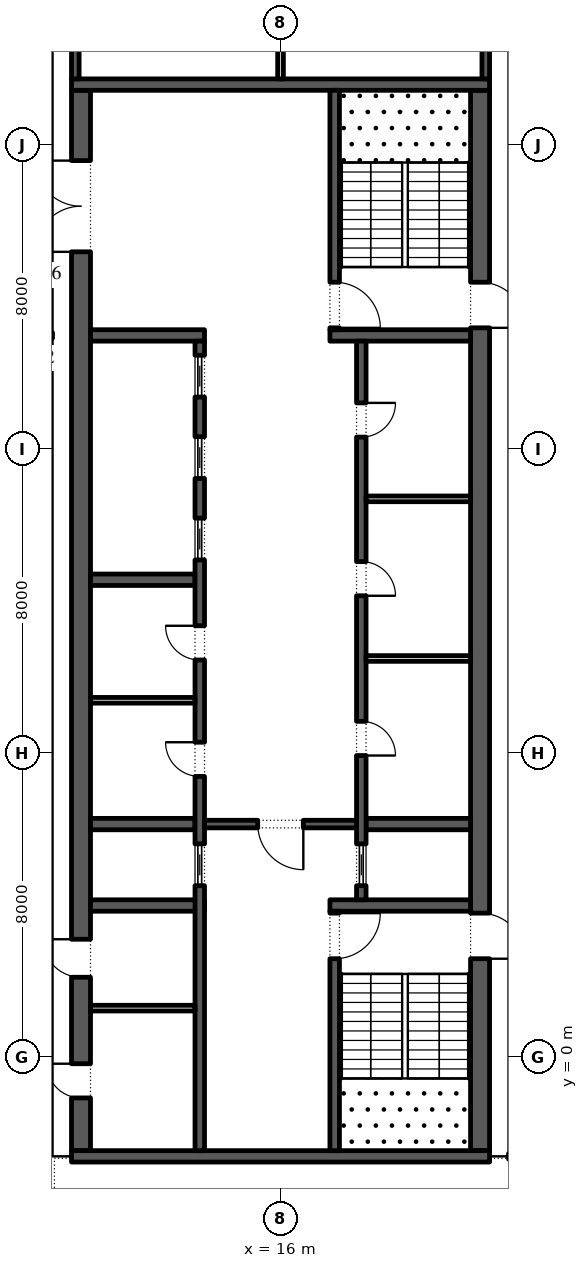
"""IFC4 building model, lengths in metres.
Left out: names, types, materials, properties, quantities, classifications, styles, units other than length and angle.
Written with IfcOpenShell. Run it as: python <this file> out.ifc"""

import sys

from ifc_helpers import new_model, si_unit, direction, frame, frame_2d, origin, place, context, subcontext, project, spatial, rectangle, extrude, element, fill, save


model = new_model("IFC4")
c1 = context("Model", 3, precision=1e-05, world=origin(), true_north=direction((0.0, 1.0)))
c2 = subcontext(c1, "Body", "Model", "MODEL_VIEW")
j1 = project(units=[si_unit("LENGTHUNIT", "METRE"), si_unit("PLANEANGLEUNIT", "RADIAN")], contexts=[c1])
p1 = place(None, origin())
s1 = spatial("IfcSite", under=j1, at=p1, CompositionType="ELEMENT")
p2 = place(p1, origin())
s2 = spatial("IfcBuilding", under=s1, at=p2, CompositionType="ELEMENT")
p3 = place(p2, frame((0.0, 0.0, 338.4)))
s3 = spatial("IfcBuildingStorey", under=s2, at=p3, CompositionType="ELEMENT", Elevation=338.4)
p4 = place(p3, frame((21.25, -2.45, 0.0), z_axis=(0.0, 0.0, 1.0), x_axis=(0.0, 1.0, 0.0)))
e1 = element("IfcWall", 1, at=p4, inside=s3, PredefinedType="SHEAR", context=c2, shape_type="SweptSolid", body=[
    extrude(rectangle(XDim=27.9, YDim=0.5, at=frame_2d((13.95, 0.0))), origin(), (0.0, 0.0, 1.0), 4.0),
])
p5 = place(p4, frame((5.05, 0.0, 0.0)))
e2 = element("IfcOpeningElement", 2, at=p5, cuts=e1, PredefinedType="OPENING", context=c2, shape_type="SweptSolid", body=[
    extrude(rectangle(XDim=1.2, YDim=2.1, at=frame_2d((0.6, 1.05))), frame((0.0, 0.26, 0.0), z_axis=(0.0, -1.0, 0.0), x_axis=(1.0, 0.0, 0.0)), (0.0, 0.0, 1.0), 0.52),
])
p6 = place(p4, frame((21.65, 0.0, 0.0)))
e3 = element("IfcOpeningElement", 3, at=p6, cuts=e1, PredefinedType="OPENING", context=c2, shape_type="SweptSolid", body=[
    extrude(rectangle(XDim=1.2, YDim=2.1, at=frame_2d((0.6, 1.05))), frame((0.0, 0.26, 0.0), z_axis=(0.0, -1.0, 0.0), x_axis=(1.0, 0.0, 0.0)), (0.0, 0.0, 1.0), 0.52),
])
p7 = place(p3, frame((10.75, -2.45, 0.0), z_axis=(0.0, 0.0, 1.0), x_axis=(0.0, 1.0, 0.0)))
e4 = element("IfcWall", 4, at=p7, inside=s3, PredefinedType="SHEAR", context=c2, shape_type="SweptSolid", body=[
    extrude(rectangle(XDim=27.9, YDim=0.5, at=frame_2d((13.95, 0.0))), origin(), (0.0, 0.0, 1.0), 4.0),
])
p8 = place(p7, frame((23.65, 0.0, 0.0)))
e5 = element("IfcOpeningElement", 5, at=p8, cuts=e4, PredefinedType="OPENING", context=c2, shape_type="SweptSolid", body=[
    extrude(rectangle(XDim=2.4, YDim=2.1, at=frame_2d((1.2, 1.05))), frame((0.0, 0.26, 0.0), z_axis=(0.0, -1.0, 0.0), x_axis=(1.0, 0.0, 0.0)), (0.0, 0.0, 1.0), 0.52),
])
p9 = place(p7, frame((1.387, 0.0, 0.0)))
e6 = element("IfcOpeningElement", 6, at=p9, cuts=e4, PredefinedType="OPENING", context=c2, shape_type="SweptSolid", body=[
    extrude(rectangle(XDim=0.9, YDim=2.1, at=frame_2d((0.45, 1.05))), frame((0.0, 0.26, 0.0), z_axis=(0.0, -1.0, 0.0), x_axis=(1.0, 0.0, 0.0)), (0.0, 0.0, 1.0), 0.52),
])
p10 = place(p7, frame((4.562, 0.0, 0.0)))
e7 = element("IfcOpeningElement", 7, at=p10, cuts=e4, PredefinedType="OPENING", context=c2, shape_type="SweptSolid", body=[
    extrude(rectangle(XDim=1.0, YDim=2.1, at=frame_2d((0.5, 1.05))), frame((0.0, 0.26, 0.0), z_axis=(0.0, -1.0, 0.0), x_axis=(1.0, 0.0, 0.0)), (0.0, 0.0, 1.0), 0.52),
])
for number, where, z_axis, x_axis in (
    (8, (10.5, -2.6, 0.0), (0.0, 0.0, 1.0), (1.0, 0.0, 0.0)),
    (9, (10.5, 25.6, 0.0), (0.0, 0.0, 1.0), (1.0, 0.0, 0.0)),
):
    element("IfcWall", number, at=place(p3, frame(where, z_axis=z_axis, x_axis=x_axis)), inside=s3, PredefinedType="SHEAR", context=c2, shape_type="SweptSolid", body=[
        extrude(rectangle(XDim=11.0, YDim=0.3, at=frame_2d((5.5, 0.0))), origin(), (0.0, 0.0, 1.0), 4.0),
    ])
p11 = place(p3, frame((17.3, 4.0, 0.0), z_axis=(0.0, 0.0, 1.0), x_axis=(1.0, 0.0, 0.0)))
e10 = element("IfcWall", 10, at=p11, inside=s3, PredefinedType="SHEAR", context=c2, shape_type="SweptSolid", body=[
    extrude(rectangle(XDim=3.7, YDim=0.3, at=frame_2d((1.85, 0.0))), origin(), (0.0, 0.0, 1.0), 4.0),
])
p12 = place(p3, frame((17.425, -2.45, 0.0), z_axis=(0.0, 0.0, 1.0), x_axis=(0.0, 1.0, 0.0)))
e11 = element("IfcWall", 11, at=p12, inside=s3, PredefinedType="SHEAR", context=c2, shape_type="SweptSolid", body=[
    extrude(rectangle(XDim=6.3, YDim=0.25, at=frame_2d((3.15, 0.0))), origin(), (0.0, 0.0, 1.0), 4.0),
])
p13 = place(p12, frame((5.05, 0.0, 0.0)))
e12 = element("IfcOpeningElement", 12, at=p13, cuts=e11, PredefinedType="OPENING", context=c2, shape_type="SweptSolid", body=[
    extrude(rectangle(XDim=1.2, YDim=2.1, at=frame_2d((0.6, 1.05))), frame((0.0, 0.135, 0.0), z_axis=(0.0, -1.0, 0.0), x_axis=(1.0, 0.0, 0.0)), (0.0, 0.0, 1.0), 0.27),
])
p14 = place(p3, frame((17.3, 19.0, 0.0), z_axis=(0.0, 0.0, 1.0), x_axis=(1.0, 0.0, 0.0)))
e13 = element("IfcWall", 13, at=p14, inside=s3, PredefinedType="SHEAR", context=c2, shape_type="SweptSolid", body=[
    extrude(rectangle(XDim=3.7, YDim=0.3, at=frame_2d((1.85, 0.0))), origin(), (0.0, 0.0, 1.0), 4.0),
])
p15 = place(p3, frame((17.425, 19.15, 0.0), z_axis=(0.0, 0.0, 1.0), x_axis=(0.0, 1.0, 0.0)))
e14 = element("IfcWall", 14, at=p15, inside=s3, PredefinedType="SHEAR", context=c2, shape_type="SweptSolid", body=[
    extrude(rectangle(XDim=6.3, YDim=0.25, at=frame_2d((3.15, 0.0))), origin(), (0.0, 0.0, 1.0), 4.0),
])
p16 = place(p15, frame((0.05, 0.0, 0.0)))
e15 = element("IfcOpeningElement", 15, at=p16, cuts=e14, PredefinedType="OPENING", context=c2, shape_type="SweptSolid", body=[
    extrude(rectangle(XDim=1.2, YDim=2.1, at=frame_2d((0.6, 1.05))), frame((0.0, 0.135, 0.0), z_axis=(0.0, -1.0, 0.0), x_axis=(1.0, 0.0, 0.0)), (0.0, 0.0, 1.0), 0.27),
])
p17 = place(p3, frame((18.25, 6.143, 0.0), z_axis=(0.0, 0.0, 1.0), x_axis=(1.0, 0.0, 0.0)))
e16 = element("IfcWall", 16, at=p17, inside=s3, PredefinedType="SHEAR", context=c2, shape_type="SweptSolid", body=[
    extrude(rectangle(XDim=2.75, YDim=0.3, at=frame_2d((1.375, 0.0))), origin(), (0.0, 0.0, 1.0), 4.0),
])
p18 = place(p3, frame((18.125, 4.15, 0.0), z_axis=(0.0, 0.0, 1.0), x_axis=(0.0, 1.0, 0.0)))
e17 = element("IfcWall", 17, at=p18, inside=s3, PredefinedType="SHEAR", context=c2, shape_type="SweptSolid", body=[
    extrude(rectangle(XDim=14.7, YDim=0.25, at=frame_2d((7.35, 0.0))), origin(), (0.0, 0.0, 1.0), 4.0),
])
p19 = place(p18, frame((3.796, 0.0, 0.0)))
e18 = element("IfcOpeningElement", 18, at=p19, cuts=e17, PredefinedType="OPENING", context=c2, shape_type="SweptSolid", body=[
    extrude(rectangle(XDim=0.9, YDim=2.1, at=frame_2d((0.45, 1.05))), frame((0.0, 0.135, 0.0), z_axis=(0.0, -1.0, 0.0), x_axis=(1.0, 0.0, 0.0)), (0.0, 0.0, 1.0), 0.27),
])
p20 = place(p18, frame((8.0, 0.0, 0.0)))
e19 = element("IfcOpeningElement", 19, at=p20, cuts=e17, PredefinedType="OPENING", context=c2, shape_type="SweptSolid", body=[
    extrude(rectangle(XDim=0.9, YDim=2.1, at=frame_2d((0.45, 1.05))), frame((0.0, 0.135, 0.0), z_axis=(0.0, -1.0, 0.0), x_axis=(1.0, 0.0, 0.0)), (0.0, 0.0, 1.0), 0.27),
])
p21 = place(p18, frame((12.175, 0.0, 0.0)))
e20 = element("IfcOpeningElement", 20, at=p21, cuts=e17, PredefinedType="OPENING", context=c2, shape_type="SweptSolid", body=[
    extrude(rectangle(XDim=0.9, YDim=2.1, at=frame_2d((0.45, 1.05))), frame((0.0, 0.135, 0.0), z_axis=(0.0, -1.0, 0.0), x_axis=(1.0, 0.0, 0.0)), (0.0, 0.0, 1.0), 0.27),
])
p22 = place(p18, frame((0.371, 0.0, 0.0)))
e21 = element("IfcOpeningElement", 21, at=p22, cuts=e17, PredefinedType="OPENING", context=c2, shape_type="SweptSolid", body=[
    extrude(rectangle(XDim=1.1, YDim=2.1, at=frame_2d((0.55, 1.05))), frame((0.0, 0.135, 0.0), z_axis=(0.0, -1.0, 0.0), x_axis=(1.0, 0.0, 0.0)), (0.0, 0.0, 1.0), 0.27),
])
for number, where, z_axis, x_axis in (
    (22, (18.25, 10.5, 0.0), (0.0, 0.0, 1.0), (1.0, 0.0, 0.0)),
    (23, (18.25, 14.7, 0.0), (0.0, 0.0, 1.0), (1.0, 0.0, 0.0)),
):
    element("IfcWall", number, at=place(p3, frame(where, z_axis=z_axis, x_axis=x_axis)), inside=s3, PredefinedType="PARTITIONING", context=c2, shape_type="SweptSolid", body=[
        extrude(rectangle(XDim=2.75, YDim=0.15, at=frame_2d((1.375, 0.0))), origin(), (0.0, 0.0, 1.0), 4.0),
    ])
p23 = place(p3, frame((11.0, 4.0, 0.0), z_axis=(0.0, 0.0, 1.0), x_axis=(1.0, 0.0, 0.0)))
e24 = element("IfcWall", 24, at=p23, inside=s3, PredefinedType="SHEAR", context=c2, shape_type="SweptSolid", body=[
    extrude(rectangle(XDim=3.0, YDim=0.3, at=frame_2d((1.5, 0.0))), origin(), (0.0, 0.0, 1.0), 4.0),
])
for number, where, z_axis, x_axis in (
    (25, (11.0, 6.143, 0.0), (0.0, 0.0, 1.0), (1.0, 0.0, 0.0)),
    (26, (11.0, 12.571, 0.0), (0.0, 0.0, 1.0), (1.0, 0.0, 0.0)),
):
    element("IfcWall", number, at=place(p3, frame(where, z_axis=z_axis, x_axis=x_axis)), inside=s3, PredefinedType="SHEAR", context=c2, shape_type="SweptSolid", body=[
        extrude(rectangle(XDim=2.75, YDim=0.3, at=frame_2d((1.375, 0.0))), origin(), (0.0, 0.0, 1.0), 4.0),
    ])
p24 = place(p3, frame((11.0, 19.0, 0.0), z_axis=(0.0, 0.0, 1.0), x_axis=(1.0, 0.0, 0.0)))
e27 = element("IfcWall", 27, at=p24, inside=s3, PredefinedType="SHEAR", context=c2, shape_type="SweptSolid", body=[
    extrude(rectangle(XDim=3.0, YDim=0.3, at=frame_2d((1.5, 0.0))), origin(), (0.0, 0.0, 1.0), 4.0),
])
p25 = place(p3, frame((13.875, -2.45, 0.0), z_axis=(0.0, 0.0, 1.0), x_axis=(0.0, 1.0, 0.0)))
e28 = element("IfcWall", 28, at=p25, inside=s3, PredefinedType="SHEAR", context=c2, shape_type="SweptSolid", body=[
    extrude(rectangle(XDim=21.3, YDim=0.25, at=frame_2d((10.65, 0.0))), origin(), (0.0, 0.0, 1.0), 4.0),
])
p26 = place(p25, frame((9.846, 0.0, 0.0)))
e29 = element("IfcOpeningElement", 29, at=p26, cuts=e28, PredefinedType="OPENING", context=c2, shape_type="SweptSolid", body=[
    extrude(rectangle(XDim=0.9, YDim=2.1, at=frame_2d((0.45, 1.05))), frame((0.0, 0.135, 0.0), z_axis=(0.0, -1.0, 0.0), x_axis=(1.0, 0.0, 0.0)), (0.0, 0.0, 1.0), 0.27),
])
p27 = place(p25, frame((12.911, 0.0, 0.0)))
e30 = element("IfcOpeningElement", 30, at=p27, cuts=e28, PredefinedType="OPENING", context=c2, shape_type="SweptSolid", body=[
    extrude(rectangle(XDim=0.9, YDim=2.1, at=frame_2d((0.45, 1.05))), frame((0.0, 0.135, 0.0), z_axis=(0.0, -1.0, 0.0), x_axis=(1.0, 0.0, 0.0)), (0.0, 0.0, 1.0), 0.27),
])
p28 = place(p25, frame((6.971, 0.0, 0.0)))
e31 = element("IfcOpeningElement", 31, at=p28, cuts=e28, PredefinedType="OPENING", context=c2, shape_type="SweptSolid", body=[
    extrude(rectangle(XDim=1.1, YDim=2.1, at=frame_2d((0.55, 1.05))), frame((0.0, 0.135, 0.0), z_axis=(0.0, -1.0, 0.0), x_axis=(1.0, 0.0, 0.0)), (0.0, 0.0, 1.0), 0.27),
])
p29 = place(p25, frame((15.543, 0.0, 0.0)))
e32 = element("IfcOpeningElement", 32, at=p29, cuts=e28, PredefinedType="OPENING", context=c2, shape_type="SweptSolid", body=[
    extrude(rectangle(XDim=1.1, YDim=2.1, at=frame_2d((0.55, 1.05))), frame((0.0, 0.135, 0.0), z_axis=(0.0, -1.0, 0.0), x_axis=(1.0, 0.0, 0.0)), (0.0, 0.0, 1.0), 0.27),
])
p30 = place(p25, frame((17.686, 0.0, 0.0)))
e33 = element("IfcOpeningElement", 33, at=p30, cuts=e28, PredefinedType="OPENING", context=c2, shape_type="SweptSolid", body=[
    extrude(rectangle(XDim=1.1, YDim=2.1, at=frame_2d((0.55, 1.05))), frame((0.0, 0.135, 0.0), z_axis=(0.0, -1.0, 0.0), x_axis=(1.0, 0.0, 0.0)), (0.0, 0.0, 1.0), 0.27),
])
p31 = place(p25, frame((19.829, 0.0, 0.0)))
e34 = element("IfcOpeningElement", 34, at=p31, cuts=e28, PredefinedType="OPENING", context=c2, shape_type="SweptSolid", body=[
    extrude(rectangle(XDim=1.1, YDim=2.1, at=frame_2d((0.55, 1.05))), frame((0.0, 0.135, 0.0), z_axis=(0.0, -1.0, 0.0), x_axis=(1.0, 0.0, 0.0)), (0.0, 0.0, 1.0), 0.27),
])
p32 = place(p3, frame((11.0, 9.4, 0.0), z_axis=(0.0, 0.0, 1.0), x_axis=(1.0, 0.0, 0.0)))
e35 = element("IfcWall", 35, at=p32, inside=s3, PredefinedType="PARTITIONING", context=c2, shape_type="SweptSolid", body=[
    extrude(rectangle(XDim=2.75, YDim=0.15, at=frame_2d((1.375, 0.0))), origin(), (0.0, 0.0, 1.0), 4.0),
])
p33 = place(p3, frame((14.0, 6.143, 0.0), z_axis=(0.0, 0.0, 1.0), x_axis=(1.0, 0.0, 0.0)))
e36 = element("IfcWall", 36, at=p33, inside=s3, PredefinedType="SHEAR", context=c2, shape_type="SweptSolid", body=[
    extrude(rectangle(XDim=4.0, YDim=0.2, at=frame_2d((2.0, 0.0))), origin(), (0.0, 0.0, 1.0), 4.0),
])
p34 = place(p33, frame((1.4, 0.0, 0.0)))
e37 = element("IfcOpeningElement", 37, at=p34, cuts=e36, PredefinedType="OPENING", context=c2, shape_type="SweptSolid", body=[
    extrude(rectangle(XDim=1.2, YDim=2.1, at=frame_2d((0.6, 1.05))), frame((0.0, 0.11, 0.0), z_axis=(0.0, -1.0, 0.0), x_axis=(1.0, 0.0, 0.0)), (0.0, 0.0, 1.0), 0.22),
])
p35 = place(p3, frame((11.0, 1.3, 0.0), z_axis=(0.0, 0.0, 1.0), x_axis=(1.0, 0.0, 0.0)))
e38 = element("IfcWall", 38, at=p35, inside=s3, PredefinedType="PARTITIONING", context=c2, shape_type="SweptSolid", body=[
    extrude(rectangle(XDim=2.75, YDim=0.15, at=frame_2d((1.375, 0.0))), origin(), (0.0, 0.0, 1.0), 4.0),
])
p36 = place(p3, frame((21.4, 25.75, 0.0), z_axis=(0.0, 0.0, 1.0), x_axis=(0.0, 1.0, 0.0)))
e39 = element("IfcWall", 39, at=p36, inside=s3, PredefinedType="SHEAR", context=c2, shape_type="SweptSolid", body=[
    extrude(rectangle(XDim=15.05, YDim=0.2, at=frame_2d((7.525, 0.0))), origin(), (0.0, 0.0, 1.0), 4.0),
])
p37 = place(p36, frame((7.075, 0.0, 0.0)))
e40 = element("IfcOpeningElement", 40, at=p37, cuts=e39, PredefinedType="OPENING", context=c2, shape_type="SweptSolid", body=[
    extrude(rectangle(XDim=0.9, YDim=2.1, at=frame_2d((0.45, 1.05))), frame((0.0, 0.11, 0.0), z_axis=(0.0, -1.0, 0.0), x_axis=(1.0, 0.0, 0.0)), (0.0, 0.0, 1.0), 0.22),
])
p38 = place(p3, frame((10.6, 25.75, 0.0), z_axis=(0.0, 0.0, 1.0), x_axis=(0.0, 1.0, 0.0)))
e41 = element("IfcWall", 41, at=p38, inside=s3, PredefinedType="SHEAR", context=c2, shape_type="SweptSolid", body=[
    extrude(rectangle(XDim=15.05, YDim=0.2, at=frame_2d((7.525, 0.0))), origin(), (0.0, 0.0, 1.0), 4.0),
])
p39 = place(p38, frame((7.075, 0.0, 0.0)))
e42 = element("IfcOpeningElement", 42, at=p39, cuts=e41, PredefinedType="OPENING", context=c2, shape_type="SweptSolid", body=[
    extrude(rectangle(XDim=0.9, YDim=2.1, at=frame_2d((0.45, 1.05))), frame((0.0, 0.11, 0.0), z_axis=(0.0, -1.0, 0.0), x_axis=(1.0, 0.0, 0.0)), (0.0, 0.0, 1.0), 0.22),
])
p40 = place(p3, frame((16.0, 25.75, 0.0), z_axis=(0.0, 0.0, 1.0), x_axis=(0.0, 1.0, 0.0)))
e43 = element("IfcWall", 43, at=p40, inside=s3, PredefinedType="PARTITIONING", context=c2, shape_type="SweptSolid", body=[
    extrude(rectangle(XDim=15.05, YDim=0.15, at=frame_2d((7.525, 0.0))), origin(), (0.0, 0.0, 1.0), 4.0),
])
p41 = place(p19, frame((0.9, -0.2, 0.0), z_axis=(0.0, 0.0, 1.0), x_axis=(-1.0, 0.0, 0.0)))
e44 = element("IfcDoor", 44, at=p41, inside=s3, OperationType="SINGLE_SWING_LEFT", PredefinedType="DOOR", context=c2, shape_type="SweptSolid", body=[
    extrude(rectangle(XDim=0.9, YDim=2.1, at=frame_2d((0.45, 1.05))), frame((0.0, -0.075, 0.0), z_axis=(0.0, -1.0, 0.0), x_axis=(1.0, 0.0, 0.0)), (0.0, 0.0, 1.0), 0.05),
])
fill(e18, e44)
p42 = place(p20, frame((0.9, -0.2, 0.0), z_axis=(0.0, 0.0, 1.0), x_axis=(-1.0, 0.0, 0.0)))
e45 = element("IfcDoor", 45, at=p42, inside=s3, OperationType="SINGLE_SWING_LEFT", PredefinedType="DOOR", context=c2, shape_type="SweptSolid", body=[
    extrude(rectangle(XDim=0.9, YDim=2.1, at=frame_2d((0.45, 1.05))), frame((0.0, -0.075, 0.0), z_axis=(0.0, -1.0, 0.0), x_axis=(1.0, 0.0, 0.0)), (0.0, 0.0, 1.0), 0.05),
])
fill(e19, e45)
p43 = place(p21, frame((0.9, -0.2, 0.0), z_axis=(0.0, 0.0, 1.0), x_axis=(-1.0, 0.0, 0.0)))
e46 = element("IfcDoor", 46, at=p43, inside=s3, OperationType="SINGLE_SWING_RIGHT", PredefinedType="DOOR", context=c2, shape_type="SweptSolid", body=[
    extrude(rectangle(XDim=0.9, YDim=2.1, at=frame_2d((0.45, 1.05))), frame((0.0, -0.075, 0.0), z_axis=(0.0, -1.0, 0.0), x_axis=(1.0, 0.0, 0.0)), (0.0, 0.0, 1.0), 0.05),
])
fill(e20, e46)
p44 = place(p22, origin())
e47 = element("IfcDoor", 47, at=p44, inside=s3, OperationType="SLIDING_TO_LEFT", PredefinedType="DOOR", context=c2, shape_type="SweptSolid", body=[
    extrude(rectangle(XDim=1.1, YDim=2.1, at=frame_2d((0.55, 1.05))), frame((0.0, 0.025, 0.0), z_axis=(0.0, -1.0, 0.0), x_axis=(1.0, 0.0, 0.0)), (0.0, 0.0, 1.0), 0.05),
])
fill(e21, e47)
p45 = place(p26, origin())
e48 = element("IfcDoor", 48, at=p45, inside=s3, OperationType="SINGLE_SWING_LEFT", PredefinedType="DOOR", context=c2, shape_type="SweptSolid", body=[
    extrude(rectangle(XDim=0.9, YDim=2.1, at=frame_2d((0.45, 1.05))), frame((0.0, 0.125, 0.0), z_axis=(0.0, -1.0, 0.0), x_axis=(1.0, 0.0, 0.0)), (0.0, 0.0, 1.0), 0.05),
])
fill(e29, e48)
p46 = place(p27, origin())
e49 = element("IfcDoor", 49, at=p46, inside=s3, OperationType="SINGLE_SWING_LEFT", PredefinedType="DOOR", context=c2, shape_type="SweptSolid", body=[
    extrude(rectangle(XDim=0.9, YDim=2.1, at=frame_2d((0.45, 1.05))), frame((0.0, 0.125, 0.0), z_axis=(0.0, -1.0, 0.0), x_axis=(1.0, 0.0, 0.0)), (0.0, 0.0, 1.0), 0.05),
])
fill(e30, e49)
p47 = place(p28, origin())
e50 = element("IfcDoor", 50, at=p47, inside=s3, OperationType="SLIDING_TO_LEFT", PredefinedType="DOOR", context=c2, shape_type="SweptSolid", body=[
    extrude(rectangle(XDim=1.1, YDim=2.1, at=frame_2d((0.55, 1.05))), frame((0.0, 0.025, 0.0), z_axis=(0.0, -1.0, 0.0), x_axis=(1.0, 0.0, 0.0)), (0.0, 0.0, 1.0), 0.05),
])
fill(e31, e50)
p48 = place(p29, origin())
e51 = element("IfcDoor", 51, at=p48, inside=s3, OperationType="SLIDING_TO_LEFT", PredefinedType="DOOR", context=c2, shape_type="SweptSolid", body=[
    extrude(rectangle(XDim=1.1, YDim=2.1, at=frame_2d((0.55, 1.05))), frame((0.0, 0.025, 0.0), z_axis=(0.0, -1.0, 0.0), x_axis=(1.0, 0.0, 0.0)), (0.0, 0.0, 1.0), 0.05),
])
fill(e32, e51)
p49 = place(p30, origin())
e52 = element("IfcDoor", 52, at=p49, inside=s3, OperationType="SLIDING_TO_LEFT", PredefinedType="DOOR", context=c2, shape_type="SweptSolid", body=[
    extrude(rectangle(XDim=1.1, YDim=2.1, at=frame_2d((0.55, 1.05))), frame((0.0, 0.025, 0.0), z_axis=(0.0, -1.0, 0.0), x_axis=(1.0, 0.0, 0.0)), (0.0, 0.0, 1.0), 0.05),
])
fill(e33, e52)
p50 = place(p31, origin())
e53 = element("IfcDoor", 53, at=p50, inside=s3, OperationType="SLIDING_TO_LEFT", PredefinedType="DOOR", context=c2, shape_type="SweptSolid", body=[
    extrude(rectangle(XDim=1.1, YDim=2.1, at=frame_2d((0.55, 1.05))), frame((0.0, 0.025, 0.0), z_axis=(0.0, -1.0, 0.0), x_axis=(1.0, 0.0, 0.0)), (0.0, 0.0, 1.0), 0.05),
])
fill(e34, e53)
p51 = place(p34, frame((1.2, 0.0, 0.0), z_axis=(0.0, 0.0, 1.0), x_axis=(-1.0, 0.0, 0.0)))
e54 = element("IfcDoor", 54, at=p51, inside=s3, OperationType="SINGLE_SWING_RIGHT", PredefinedType="DOOR", context=c2, shape_type="SweptSolid", body=[
    extrude(rectangle(XDim=1.2, YDim=2.1, at=frame_2d((0.6, 1.05))), frame((0.0, 0.025, 0.0), z_axis=(0.0, -1.0, 0.0), x_axis=(1.0, 0.0, 0.0)), (0.0, 0.0, 1.0), 0.05),
])
fill(e37, e54)
p52 = place(p8, origin())
e55 = element("IfcDoor", 55, at=p52, inside=s3, OperationType="DOUBLE_DOOR_SINGLE_SWING", PredefinedType="DOOR", context=c2, shape_type="SweptSolid", body=[
    extrude(rectangle(XDim=2.4, YDim=2.1, at=frame_2d((1.2, 1.05))), frame((0.0, 0.025, 0.0), z_axis=(0.0, -1.0, 0.0), x_axis=(1.0, 0.0, 0.0)), (0.0, 0.0, 1.0), 0.05),
])
fill(e5, e55)
p53 = place(p13, frame((1.2, 0.0, 0.0), z_axis=(0.0, 0.0, 1.0), x_axis=(-1.0, 0.0, 0.0)))
e56 = element("IfcDoor", 56, at=p53, inside=s3, OperationType="SINGLE_SWING_RIGHT", PredefinedType="DOOR", context=c2, shape_type="SweptSolid", body=[
    extrude(rectangle(XDim=1.2, YDim=2.1, at=frame_2d((0.6, 1.05))), frame((0.0, 0.025, 0.0), z_axis=(0.0, -1.0, 0.0), x_axis=(1.0, 0.0, 0.0)), (0.0, 0.0, 1.0), 0.05),
])
fill(e12, e56)
p54 = place(p5, frame((1.2, 0.0, 0.0), z_axis=(0.0, 0.0, 1.0), x_axis=(-1.0, 0.0, 0.0)))
e57 = element("IfcDoor", 57, at=p54, inside=s3, OperationType="SINGLE_SWING_LEFT", PredefinedType="DOOR", context=c2, shape_type="SweptSolid", body=[
    extrude(rectangle(XDim=1.2, YDim=2.1, at=frame_2d((0.6, 1.05))), frame((0.0, 0.025, 0.0), z_axis=(0.0, -1.0, 0.0), x_axis=(1.0, 0.0, 0.0)), (0.0, 0.0, 1.0), 0.05),
])
fill(e2, e57)
p55 = place(p16, frame((1.2, 0.0, 0.0), z_axis=(0.0, 0.0, 1.0), x_axis=(-1.0, 0.0, 0.0)))
e58 = element("IfcDoor", 58, at=p55, inside=s3, OperationType="SINGLE_SWING_LEFT", PredefinedType="DOOR", context=c2, shape_type="SweptSolid", body=[
    extrude(rectangle(XDim=1.2, YDim=2.1, at=frame_2d((0.6, 1.05))), frame((0.0, 0.025, 0.0), z_axis=(0.0, -1.0, 0.0), x_axis=(1.0, 0.0, 0.0)), (0.0, 0.0, 1.0), 0.05),
])
fill(e15, e58)
p56 = place(p6, frame((1.2, 0.0, 0.0), z_axis=(0.0, 0.0, 1.0), x_axis=(-1.0, 0.0, 0.0)))
e59 = element("IfcDoor", 59, at=p56, inside=s3, OperationType="SINGLE_SWING_LEFT", PredefinedType="DOOR", context=c2, shape_type="SweptSolid", body=[
    extrude(rectangle(XDim=1.2, YDim=2.1, at=frame_2d((0.6, 1.05))), frame((0.0, 0.025, 0.0), z_axis=(0.0, -1.0, 0.0), x_axis=(1.0, 0.0, 0.0)), (0.0, 0.0, 1.0), 0.05),
])
fill(e3, e59)
p57 = place(p9, origin())
e60 = element("IfcDoor", 60, at=p57, inside=s3, OperationType="SINGLE_SWING_LEFT", PredefinedType="DOOR", context=c2, shape_type="SweptSolid", body=[
    extrude(rectangle(XDim=0.9, YDim=2.1, at=frame_2d((0.45, 1.05))), frame((0.0, -0.2, 0.0), z_axis=(0.0, -1.0, 0.0), x_axis=(1.0, 0.0, 0.0)), (0.0, 0.0, 1.0), 0.05),
])
fill(e6, e60)
p58 = place(p10, origin())
e61 = element("IfcDoor", 61, at=p58, inside=s3, OperationType="SINGLE_SWING_LEFT", PredefinedType="DOOR", context=c2, shape_type="SweptSolid", body=[
    extrude(rectangle(XDim=1.0, YDim=2.1, at=frame_2d((0.5, 1.05))), frame((0.0, -0.2, 0.0), z_axis=(0.0, -1.0, 0.0), x_axis=(1.0, 0.0, 0.0)), (0.0, 0.0, 1.0), 0.05),
])
fill(e7, e61)
save(model, sys.argv[1])
